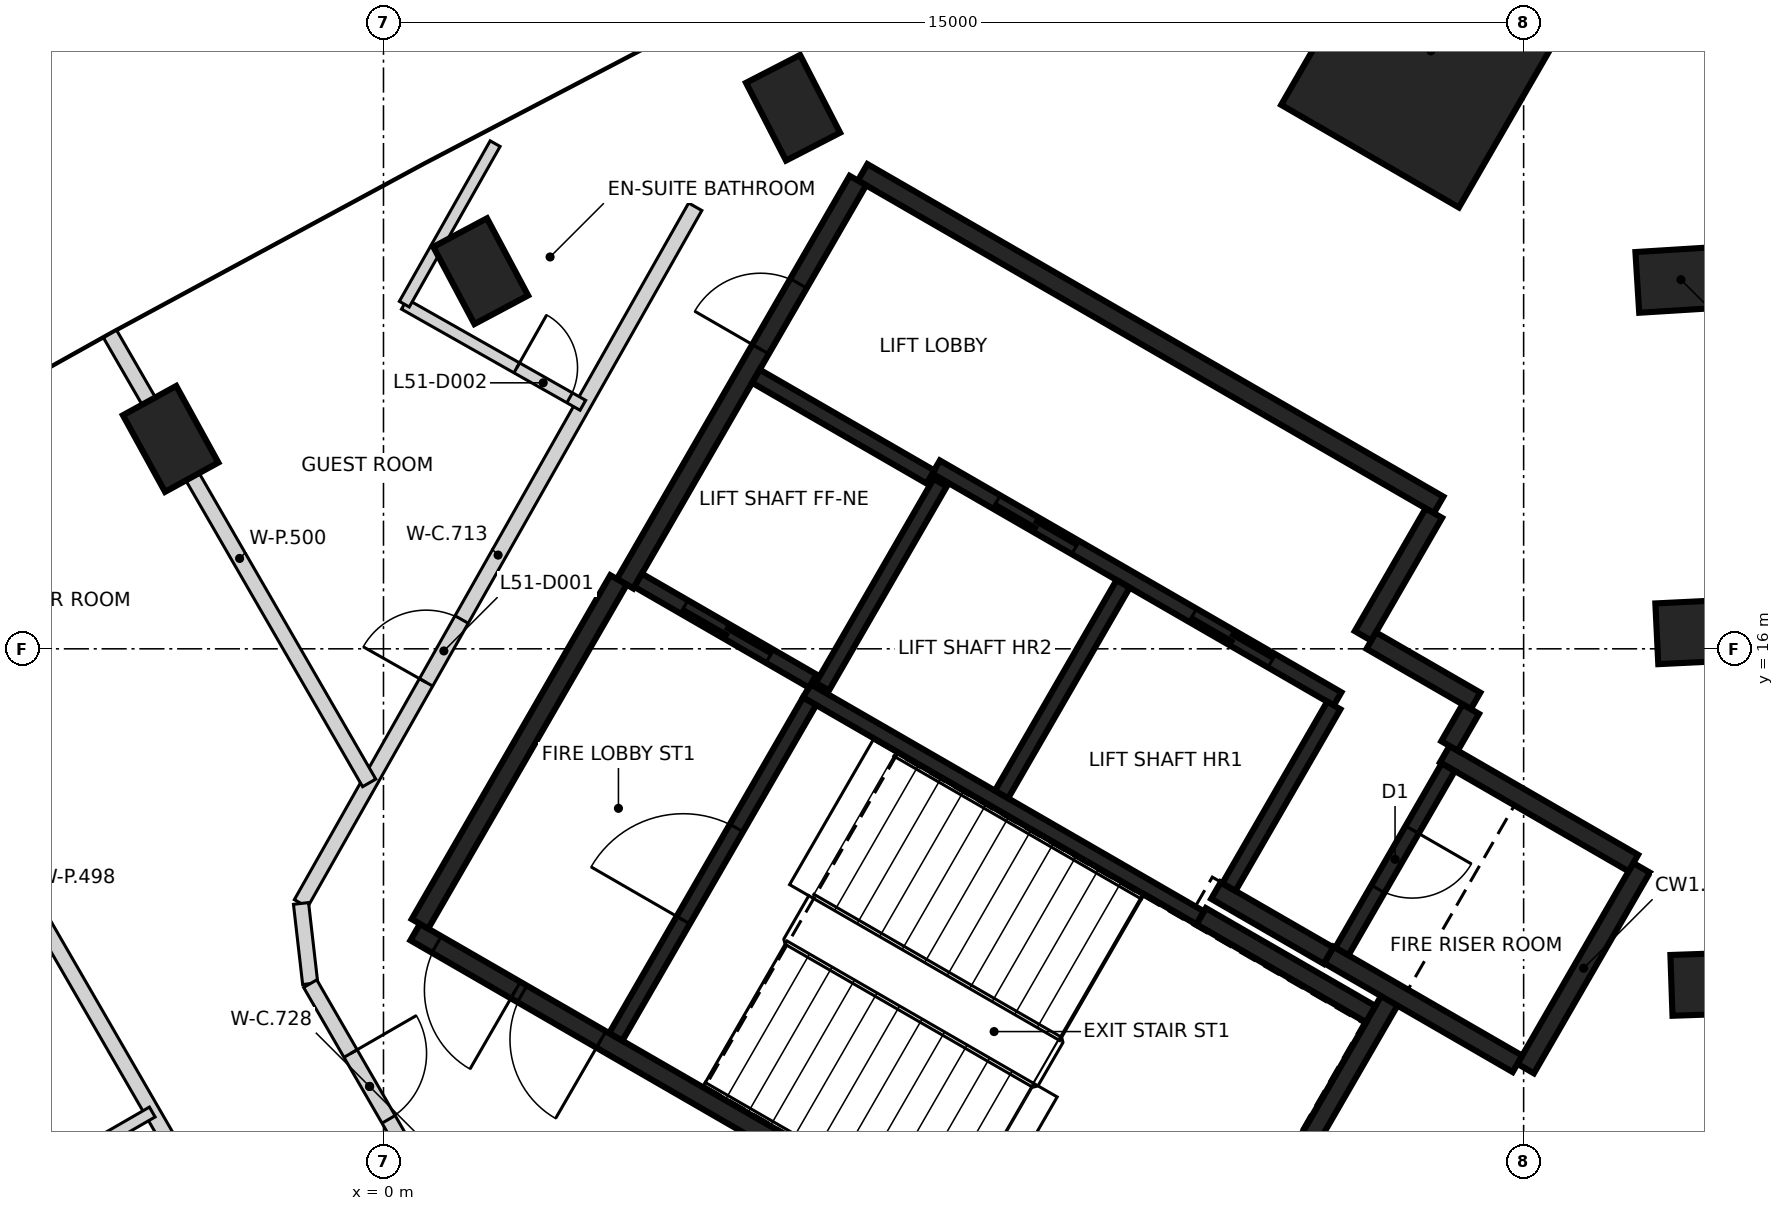
"""IFC4 building model, lengths in metres.
Left out: names, types, materials, properties, quantities, classifications, styles, units other than length and angle.
Written with IfcOpenShell. Run it as: python <this file> out.ifc"""

import sys

from ifc_helpers import new_model, si_unit, direction, frame, frame_2d, origin, origin_2d, place, context, subcontext, project, spatial, rectangle, extrude, element, fill, save


model = new_model("IFC4")
c1 = context("Model", 3, precision=1e-05, world=origin(), true_north=direction((0.0, 1.0)))
c2 = subcontext(c1, "Body", "Model", "MODEL_VIEW")
j1 = project(units=[si_unit("LENGTHUNIT", "METRE"), si_unit("PLANEANGLEUNIT", "RADIAN")], contexts=[c1])
p1 = place(None, origin())
s1 = spatial("IfcSite", under=j1, at=p1, CompositionType="ELEMENT")
p2 = place(p1, origin())
s2 = spatial("IfcBuilding", under=s1, at=p2, CompositionType="ELEMENT")
p3 = place(p2, frame((0.0, 0.0, 204.4)))
s3 = spatial("IfcBuildingStorey", under=s2, at=p3, CompositionType="ELEMENT", Elevation=204.4)
for number, where, z_axis, x_axis in (
    (1, (17.519, 11.592, -0.35), (0.0, 0.0, 1.0), (0.999, 0.034, 0.0)),
    (2, (17.326, 16.226, -0.35), (0.0, 0.0, 1.0), (0.999, 0.048, 0.0)),
    (3, (17.07, 20.856, -0.35), (0.0, 0.0, 1.0), (0.998, 0.062, 0.0)),
    (4, (5.388, 23.118, -0.35), (0.0, 0.0, 1.0), (-0.458, 0.889, 0.0)),
    (5, (1.279, 20.968, -0.35), (0.0, 0.0, 1.0), (-0.47, 0.883, 0.0)),
    (6, (-2.8, 18.762, -0.35), (0.0, 0.0, 1.0), (-0.482, 0.876, 0.0)),
):
    element("IfcColumn", number, at=place(p3, frame(where, z_axis=z_axis, x_axis=x_axis)), inside=s3, PredefinedType="COLUMN", context=c2, shape_type="SweptSolid", body=[
        extrude(rectangle(XDim=1.15, YDim=0.8, at=origin_2d()), origin(), (0.0, 0.0, 1.0), 3.6),
    ])
p4 = place(p3, frame((13.78, 23.867, -0.35), z_axis=(0.0, 0.0, 1.0), x_axis=(0.5, 0.866025403784, 0.0)))
e7 = element("IfcColumn", 7, at=p4, inside=s3, PredefinedType="COLUMN", context=c2, shape_type="SweptSolid", body=[
    extrude(rectangle(XDim=3.2, YDim=2.7, at=origin_2d()), origin(), (0.0, 0.0, 1.0), 3.6),
])
p5 = place(p3, frame((10.42, 6.498, 0.0), z_axis=(0.0, 0.0, 1.0), x_axis=(-0.866021906294, 0.500006057782, 0.0)))
e8 = element("IfcWall", 8, at=p5, inside=s3, PredefinedType="SHEAR", context=c2, shape_type="SweptSolid", body=[
    extrude(rectangle(XDim=11.55, YDim=0.25, at=frame_2d((5.775, 0.0))), origin(), (0.0, 0.0, 1.0), 3.25),
])
p6 = place(p5, frame((10.025, 0.0, 0.0)))
e9 = element("IfcOpeningElement", 9, at=p6, cuts=e8, PredefinedType="OPENING", context=c2, shape_type="SweptSolid", body=[
    extrude(rectangle(XDim=1.2, YDim=2.1, at=frame_2d((0.6, 1.05))), frame((0.0, 0.135, 0.0), z_axis=(0.0, -1.0, 0.0), x_axis=(1.0, 0.0, 0.0)), (0.0, 0.0, 1.0), 0.27),
])
p7 = place(p5, frame((8.725, 0.0, 0.0)))
e10 = element("IfcOpeningElement", 10, at=p7, cuts=e8, PredefinedType="OPENING", context=c2, shape_type="SweptSolid", body=[
    extrude(rectangle(XDim=1.2, YDim=2.1, at=frame_2d((0.6, 1.05))), frame((0.0, 0.135, 0.0), z_axis=(0.0, -1.0, 0.0), x_axis=(1.0, 0.0, 0.0)), (0.0, 0.0, 1.0), 0.27),
])
p8 = place(p3, frame((6.304, 22.269, 0.0), z_axis=(0.0, 0.0, 1.0), x_axis=(0.866022959057, -0.500004234368, 0.0)))
e11 = element("IfcWall", 11, at=p8, inside=s3, PredefinedType="SHEAR", context=c2, shape_type="SweptSolid", body=[
    extrude(rectangle(XDim=8.75, YDim=0.25, at=frame_2d((4.375, 0.0))), origin(), (0.0, 0.0, 1.0), 3.25),
])
p9 = place(p3, frame((3.179, 16.856, 0.0), z_axis=(0.0, 0.0, 1.0), x_axis=(0.500001955336, 0.866024274868, 0.0)))
e12 = element("IfcWall", 12, at=p9, inside=s3, PredefinedType="SHEAR", context=c2, shape_type="SweptSolid", body=[
    extrude(rectangle(XDim=6.125, YDim=0.25, at=frame_2d((3.062, 0.0))), origin(), (0.0, 0.0, 1.0), 3.25),
])
p10 = place(p9, frame((3.563, 0.0, 0.0)))
e13 = element("IfcOpeningElement", 13, at=p10, cuts=e12, PredefinedType="OPENING", context=c2, shape_type="SweptSolid", body=[
    extrude(rectangle(XDim=1.0, YDim=2.1, at=frame_2d((0.5, 1.05))), frame((0.0, 0.135, 0.0), z_axis=(0.0, -1.0, 0.0), x_axis=(1.0, 0.0, 0.0)), (0.0, 0.0, 1.0), 0.27),
])
p11 = place(p3, frame((0.48, 12.381, 0.0), z_axis=(0.0, 0.0, 1.0), x_axis=(0.49999885962, 0.866026062182, 0.0)))
e14 = element("IfcWall", 14, at=p11, inside=s3, PredefinedType="SHEAR", context=c2, shape_type="SweptSolid", body=[
    extrude(rectangle(XDim=5.225, YDim=0.25, at=frame_2d((2.612, 0.0))), origin(), (0.0, 0.0, 1.0), 3.25),
])
p12 = place(p3, frame((13.238, 11.378, 0.0), z_axis=(0.0, 0.0, 1.0), x_axis=(-0.500008851346, -0.866020293397, 0.0)))
e15 = element("IfcWall", 15, at=p12, inside=s3, PredefinedType="SHEAR", context=c2, shape_type="SweptSolid", body=[
    extrude(rectangle(XDim=5.51, YDim=0.25, at=frame_2d((2.755, 0.0))), origin(), (0.0, 0.0, 1.0), 3.25),
])
p13 = place(p3, frame((16.552, 13.119, 0.0), z_axis=(0.0, 0.0, 1.0), x_axis=(-0.499978833458, -0.866037623948, 0.0)))
e16 = element("IfcWall", 16, at=p13, inside=s3, PredefinedType="SHEAR", context=c2, shape_type="SweptSolid", body=[
    extrude(rectangle(XDim=3.05, YDim=0.25, at=frame_2d((1.525, 0.0))), origin(), (0.0, 0.0, 1.0), 3.25),
])
p14 = place(p3, frame((14.918, 10.54, 0.0), z_axis=(0.0, 0.0, 1.0), x_axis=(-0.866063538972, 0.499933942099, 0.0)))
e17 = element("IfcWall", 17, at=p14, inside=s3, PredefinedType="SHEAR", context=c2, shape_type="SweptSolid", body=[
    extrude(rectangle(XDim=2.865, YDim=0.25, at=frame_2d((1.432, 0.0))), origin(), (0.0, 0.0, 1.0), 3.25),
])
p15 = place(p3, frame((13.963, 14.614, 0.0), z_axis=(0.0, 0.0, 1.0), x_axis=(0.866042235819, -0.499970844928, 0.0)))
e18 = element("IfcWall", 18, at=p15, inside=s3, PredefinedType="SHEAR", context=c2, shape_type="SweptSolid", body=[
    extrude(rectangle(XDim=2.865, YDim=0.25, at=frame_2d((1.432, 0.0))), origin(), (0.0, 0.0, 1.0), 3.25),
])
p16 = place(p3, frame((10.757, 12.481, 0.0), z_axis=(0.0, 0.0, 1.0), x_axis=(0.866022940537, -0.500004266446, 0.0)))
e19 = element("IfcWall", 19, at=p16, inside=s3, PredefinedType="SHEAR", context=c2, shape_type="SweptSolid", body=[
    extrude(rectangle(XDim=2.575, YDim=0.25, at=frame_2d((1.287, 0.0))), origin(), (0.0, 0.0, 1.0), 3.25),
])
p17 = place(p3, frame((13.819, 17.785, 0.0), z_axis=(0.0, 0.0, 1.0), x_axis=(-0.500039802285, -0.866002422705, 0.0)))
e20 = element("IfcWall", 20, at=p17, inside=s3, PredefinedType="SHEAR", context=c2, shape_type="SweptSolid", body=[
    extrude(rectangle(XDim=1.865, YDim=0.25, at=frame_2d((0.932, 0.0))), origin(), (0.0, 0.0, 1.0), 3.25),
])
p18 = place(p3, frame((12.433, 11.964, 0.0), z_axis=(0.0, 0.0, 1.0), x_axis=(-0.866038183914, 0.499977863513, 0.0)))
e21 = element("IfcWall", 21, at=p18, inside=s3, PredefinedType="SHEAR", context=c2, shape_type="SweptSolid", body=[
    extrude(rectangle(XDim=1.71, YDim=0.25, at=frame_2d((0.855, 0.0))), origin(), (0.0, 0.0, 1.0), 3.25),
])
p19 = place(p3, frame((12.995, 16.108, 0.0), z_axis=(0.0, 0.0, 1.0), x_axis=(0.866044474677, -0.49996696679, 0.0)))
e22 = element("IfcWall", 22, at=p19, inside=s3, PredefinedType="SHEAR", context=c2, shape_type="SweptSolid", body=[
    extrude(rectangle(XDim=1.584, YDim=0.25, at=frame_2d((0.792, 0.0))), origin(), (0.0, 0.0, 1.0), 3.25),
])
p20 = place(p3, frame((14.305, 15.207, 0.0), z_axis=(0.0, 0.0, 1.0), x_axis=(-0.499848422343, -0.866112899501, 0.0)))
e23 = element("IfcWall", 23, at=p20, inside=s3, PredefinedType="SHEAR", context=c2, shape_type="SweptSolid", body=[
    extrude(rectangle(XDim=0.559, YDim=0.25, at=frame_2d((0.28, 0.0))), origin(), (0.0, 0.0, 1.0), 3.25),
])
p21 = place(p3, frame((12.552, 15.342, 0.0), z_axis=(0.0, 0.0, 1.0), x_axis=(-0.866030299012, 0.499991521122, 0.0)))
e24 = element("IfcWall", 24, at=p21, inside=s3, PredefinedType="SHEAR", context=c2, shape_type="SweptSolid", body=[
    extrude(rectangle(XDim=6.1, YDim=0.2, at=frame_2d((3.05, 0.0))), origin(), (0.0, 0.0, 1.0), 3.25),
])
p22 = place(p21, frame((1.0, 0.0, 0.0)))
e25 = element("IfcOpeningElement", 25, at=p22, cuts=e24, PredefinedType="OPENING", context=c2, shape_type="SweptSolid", body=[
    extrude(rectangle(XDim=1.2, YDim=2.1, at=frame_2d((0.6, 1.05))), frame((0.0, 0.11, 0.0), z_axis=(0.0, -1.0, 0.0), x_axis=(1.0, 0.0, 0.0)), (0.0, 0.0, 1.0), 0.22),
])
p23 = place(p21, frame((3.982, 0.0, 0.0)))
e26 = element("IfcOpeningElement", 26, at=p23, cuts=e24, PredefinedType="OPENING", context=c2, shape_type="SweptSolid", body=[
    extrude(rectangle(XDim=1.2, YDim=2.1, at=frame_2d((0.6, 1.05))), frame((0.0, 0.11, 0.0), z_axis=(0.0, -1.0, 0.0), x_axis=(1.0, 0.0, 0.0)), (0.0, 0.0, 1.0), 0.22),
])
p24 = place(p3, frame((10.743, 12.46, 0.0), z_axis=(0.0, 0.0, 1.0), x_axis=(-0.866018848283, 0.500011354289, 0.0)))
e27 = element("IfcWall", 27, at=p24, inside=s3, PredefinedType="SHEAR", context=c2, shape_type="SweptSolid", body=[
    extrude(rectangle(XDim=5.974, YDim=0.2, at=frame_2d((2.987, 0.0))), origin(), (0.0, 0.0, 1.0), 3.25),
])
p25 = place(p3, frame((3.057, 10.895, 0.0), z_axis=(0.0, 0.0, 1.0), x_axis=(0.500027839223, 0.866009330205, 0.0)))
e28 = element("IfcWall", 28, at=p25, inside=s3, PredefinedType="SHEAR", context=c2, shape_type="SweptSolid", body=[
    extrude(rectangle(XDim=5.098, YDim=0.2, at=frame_2d((2.549, 0.0))), origin(), (0.0, 0.0, 1.0), 3.25),
])
p26 = place(p25, frame((1.774, 0.0, 0.0)))
e29 = element("IfcOpeningElement", 29, at=p26, cuts=e28, PredefinedType="OPENING", context=c2, shape_type="SweptSolid", body=[
    extrude(rectangle(XDim=1.4, YDim=2.1, at=frame_2d((0.7, 1.05))), frame((0.0, 0.11, 0.0), z_axis=(0.0, -1.0, 0.0), x_axis=(1.0, 0.0, 0.0)), (0.0, 0.0, 1.0), 0.22),
])
p27 = place(p3, frame((8.132, 14.084, 0.0), z_axis=(0.0, 0.0, 1.0), x_axis=(0.500030834389, 0.86600760081, 0.0)))
e30 = element("IfcWall", 30, at=p27, inside=s3, PredefinedType="SHEAR", context=c2, shape_type="SweptSolid", body=[
    extrude(rectangle(XDim=3.198, YDim=0.2, at=frame_2d((1.599, 0.0))), origin(), (0.0, 0.0, 1.0), 3.25),
])
p28 = place(p3, frame((14.008, 14.442, 0.0), z_axis=(0.0, 0.0, 1.0), x_axis=(-0.499986818241, -0.866033014143, 0.0)))
e31 = element("IfcWall", 31, at=p28, inside=s3, PredefinedType="SHEAR", context=c2, shape_type="SweptSolid", body=[
    extrude(rectangle(XDim=2.798, YDim=0.2, at=frame_2d((1.399, 0.0))), origin(), (0.0, 0.0, 1.0), 3.25),
])
p29 = place(p28, frame((0.949, 0.0, 0.0)))
e32 = element("IfcOpeningElement", 32, at=p29, cuts=e31, PredefinedType="OPENING", context=c2, shape_type="SweptSolid", body=[
    extrude(rectangle(XDim=0.9, YDim=2.1, at=frame_2d((0.45, 1.05))), frame((0.0, 0.11, 0.0), z_axis=(0.0, -1.0, 0.0), x_axis=(1.0, 0.0, 0.0)), (0.0, 0.0, 1.0), 0.22),
])
p30 = place(p3, frame((12.502, 15.255, 0.0), z_axis=(0.0, 0.0, 1.0), x_axis=(-0.499965018551, -0.866045599391, 0.0)))
e33 = element("IfcWall", 33, at=p30, inside=s3, PredefinedType="SHEAR", context=c2, shape_type="SweptSolid", body=[
    extrude(rectangle(XDim=2.759, YDim=0.2, at=frame_2d((1.379, 0.0))), origin(), (0.0, 0.0, 1.0), 3.25),
])
p31 = place(p3, frame((7.324, 18.187, 0.0), z_axis=(0.0, 0.0, 1.0), x_axis=(-0.499967891604, -0.866043940782, 0.0)))
e34 = element("IfcWall", 34, at=p31, inside=s3, PredefinedType="SHEAR", context=c2, shape_type="SweptSolid", body=[
    extrude(rectangle(XDim=3.1, YDim=0.2, at=frame_2d((1.55, 0.0))), origin(), (0.0, 0.0, 1.0), 3.25),
])
p32 = place(p3, frame((5.646, 15.576, 0.0), z_axis=(0.0, 0.0, 1.0), x_axis=(-0.866018407898, 0.500012117035, 0.0)))
e35 = element("IfcWall", 35, at=p32, inside=s3, PredefinedType="SHEAR", context=c2, shape_type="SweptSolid", body=[
    extrude(rectangle(XDim=2.651, YDim=0.2, at=frame_2d((1.325, 0.0))), origin(), (0.0, 0.0, 1.0), 3.25),
])
p33 = place(p32, frame((0.652, 0.0, 0.0)))
e36 = element("IfcOpeningElement", 36, at=p33, cuts=e35, PredefinedType="OPENING", context=c2, shape_type="SweptSolid", body=[
    extrude(rectangle(XDim=1.3, YDim=2.1, at=frame_2d((0.65, 1.05))), frame((0.0, 0.11, 0.0), z_axis=(0.0, -1.0, 0.0), x_axis=(1.0, 0.0, 0.0)), (0.0, 0.0, 1.0), 0.22),
])
p34 = place(p3, frame((7.196, 18.26, 0.0), z_axis=(0.0, 0.0, 1.0), x_axis=(-0.866018407898, 0.500012117035, 0.0)))
e37 = element("IfcWall", 37, at=p34, inside=s3, PredefinedType="SHEAR", context=c2, shape_type="SweptSolid", body=[
    extrude(rectangle(XDim=2.651, YDim=0.2, at=frame_2d((1.325, 0.0))), origin(), (0.0, 0.0, 1.0), 3.25),
])
p35 = place(p3, frame((-1.086, 12.65, 0.0), z_axis=(0.0, 0.0, 1.0), x_axis=(0.492552173528, 0.87028291742, 0.0)))
e38 = element("IfcWall", 38, at=p35, inside=s3, PredefinedType="PARTITIONING", context=c2, shape_type="SweptSolid", body=[
    extrude(rectangle(XDim=10.531, YDim=0.2, at=frame_2d((5.266, 0.0))), origin(), (0.0, 0.0, 1.0), 3.25),
])
p36 = place(p35, frame((3.342, 0.0, 0.0)))
e39 = element("IfcOpeningElement", 39, at=p36, cuts=e38, PredefinedType="OPENING", context=c2, shape_type="SweptSolid", body=[
    extrude(rectangle(XDim=0.95, YDim=2.1, at=frame_2d((0.475, 1.05))), frame((0.0, 0.11, 0.0), z_axis=(0.0, -1.0, 0.0), x_axis=(1.0, 0.0, 0.0)), (0.0, 0.0, 1.0), 0.22),
])
p37 = place(p3, frame((-1.085, 12.65, 0.0), z_axis=(0.0, 0.0, 1.0), x_axis=(0.113812454263, -0.993502252264, 0.0)))
e40 = element("IfcWall", 40, at=p37, inside=s3, PredefinedType="PARTITIONING", context=c2, shape_type="SweptSolid", body=[
    extrude(rectangle(XDim=1.062, YDim=0.2, at=frame_2d((0.531, 0.0))), origin(), (0.0, 0.0, 1.0), 3.25),
])
p38 = place(p3, frame((-0.964, 11.595, 0.0), z_axis=(0.0, 0.0, 1.0), x_axis=(0.500056215256, -0.865992945458, 0.0)))
e41 = element("IfcWall", 41, at=p38, inside=s3, PredefinedType="PARTITIONING", context=c2, shape_type="SweptSolid", body=[
    extrude(rectangle(XDim=3.124, YDim=0.2, at=frame_2d((1.562, 0.0))), origin(), (0.0, 0.0, 1.0), 3.25),
])
p39 = place(p38, frame((1.062, 0.0, 0.0)))
e42 = element("IfcOpeningElement", 42, at=p39, cuts=e41, PredefinedType="OPENING", context=c2, shape_type="SweptSolid", body=[
    extrude(rectangle(XDim=1.0, YDim=2.1, at=frame_2d((0.5, 1.05))), frame((0.0, 0.11, 0.0), z_axis=(0.0, -1.0, 0.0), x_axis=(1.0, 0.0, 0.0)), (0.0, 0.0, 1.0), 0.22),
])
p40 = place(p3, frame((-7.646, 17.879, 0.0), z_axis=(0.0, 0.0, 1.0), x_axis=(0.500042538917, -0.866000842536, 0.0)))
e43 = element("IfcWall", 43, at=p40, inside=s3, PredefinedType="PARTITIONING", context=c2, shape_type="SweptSolid", body=[
    extrude(rectangle(XDim=11.906, YDim=0.2, at=frame_2d((5.953, 0.0))), origin(), (0.0, 0.0, 1.0), 3.25),
])
p41 = place(p3, frame((-3.598, 20.142, 0.0), z_axis=(0.0, 0.0, 1.0), x_axis=(0.499981732209, -0.866035950442, 0.0)))
e44 = element("IfcWall", 44, at=p41, inside=s3, PredefinedType="PARTITIONING", context=c2, shape_type="SweptSolid", body=[
    extrude(rectangle(XDim=6.82, YDim=0.2, at=frame_2d((3.41, 0.0))), origin(), (0.0, 0.0, 1.0), 3.25),
])
p42 = place(p3, frame((-5.64, 8.406, 0.0), z_axis=(0.0, 0.0, 1.0), x_axis=(0.866010750942, 0.50002537861, 0.0)))
e45 = element("IfcWall", 45, at=p42, inside=s3, PredefinedType="PARTITIONING", context=c2, shape_type="SweptSolid", body=[
    extrude(rectangle(XDim=3.0, YDim=0.15, at=frame_2d((1.5, 0.0))), origin(), (0.0, 0.0, 1.0), 3.25),
])
p43 = place(p3, frame((0.274, 20.534, 0.0), z_axis=(0.0, 0.0, 1.0), x_axis=(0.870234176559, -0.492638283072, 0.0)))
e46 = element("IfcWall", 46, at=p43, inside=s3, PredefinedType="PARTITIONING", context=c2, shape_type="SweptSolid", body=[
    extrude(rectangle(XDim=2.699, YDim=0.15, at=frame_2d((1.35, 0.0))), origin(), (0.0, 0.0, 1.0), 2.35),
])
p44 = place(p43, frame((1.7, 0.0, 0.0)))
e47 = element("IfcOpeningElement", 47, at=p44, cuts=e46, PredefinedType="OPENING", context=c2, shape_type="SweptSolid", body=[
    extrude(rectangle(XDim=0.8, YDim=2.1, at=frame_2d((0.4, 1.05))), frame((0.0, 0.085, 0.0), z_axis=(0.0, -1.0, 0.0), x_axis=(1.0, 0.0, 0.0)), (0.0, 0.0, 1.0), 0.17),
])
p45 = place(p3, frame((0.274, 20.534, 0.0), z_axis=(0.0, 0.0, 1.0), x_axis=(0.492461641571, 0.870334149383, 0.0)))
e48 = element("IfcWall", 48, at=p45, inside=s3, PredefinedType="PARTITIONING", context=c2, shape_type="SweptSolid", body=[
    extrude(rectangle(XDim=2.427, YDim=0.15, at=frame_2d((1.213, 0.0))), origin(), (0.0, 0.0, 1.0), 2.35),
])
p46 = place(p33, origin())
e49 = element("IfcDoor", 49, at=p46, inside=s3, OperationType="SLIDING_TO_LEFT", PredefinedType="DOOR", context=c2, shape_type="SweptSolid", body=[
    extrude(rectangle(XDim=1.3, YDim=2.1, at=frame_2d((0.65, 1.05))), frame((0.0, 0.025, 0.0), z_axis=(0.0, -1.0, 0.0), x_axis=(1.0, 0.0, 0.0)), (0.0, 0.0, 1.0), 0.05),
])
fill(e36, e49)
p47 = place(p22, origin())
e50 = element("IfcDoor", 50, at=p47, inside=s3, OperationType="DOUBLE_DOOR_SLIDING", PredefinedType="DOOR", context=c2, shape_type="SweptSolid", body=[
    extrude(rectangle(XDim=1.2, YDim=2.1, at=frame_2d((0.6, 1.05))), frame((0.0, 0.025, 0.0), z_axis=(0.0, -1.0, 0.0), x_axis=(1.0, 0.0, 0.0)), (0.0, 0.0, 1.0), 0.05),
])
fill(e25, e50)
p48 = place(p23, origin())
e51 = element("IfcDoor", 51, at=p48, inside=s3, OperationType="DOUBLE_DOOR_SLIDING", PredefinedType="DOOR", context=c2, shape_type="SweptSolid", body=[
    extrude(rectangle(XDim=1.2, YDim=2.1, at=frame_2d((0.6, 1.05))), frame((0.0, 0.025, 0.0), z_axis=(0.0, -1.0, 0.0), x_axis=(1.0, 0.0, 0.0)), (0.0, 0.0, 1.0), 0.05),
])
fill(e26, e51)
p49 = place(p10, origin())
e52 = element("IfcDoor", 52, at=p49, inside=s3, OperationType="SINGLE_SWING_LEFT", PredefinedType="DOOR", context=c2, shape_type="SweptSolid", body=[
    extrude(rectangle(XDim=1.0, YDim=2.1, at=frame_2d((0.5, 1.05))), frame((0.0, 0.025, 0.0), z_axis=(0.0, -1.0, 0.0), x_axis=(1.0, 0.0, 0.0)), (0.0, 0.0, 1.0), 0.05),
])
fill(e13, e52)
p50 = place(p6, origin())
e53 = element("IfcDoor", 53, at=p50, inside=s3, OperationType="SINGLE_SWING_LEFT", PredefinedType="DOOR", context=c2, shape_type="SweptSolid", body=[
    extrude(rectangle(XDim=1.2, YDim=2.1, at=frame_2d((0.6, 1.05))), frame((0.0, 0.025, 0.0), z_axis=(0.0, -1.0, 0.0), x_axis=(1.0, 0.0, 0.0)), (0.0, 0.0, 1.0), 0.05),
])
fill(e9, e53)
p51 = place(p7, origin())
e54 = element("IfcDoor", 54, at=p51, inside=s3, OperationType="SINGLE_SWING_RIGHT", PredefinedType="DOOR", context=c2, shape_type="SweptSolid", body=[
    extrude(rectangle(XDim=1.2, YDim=2.1, at=frame_2d((0.6, 1.05))), frame((0.0, 0.025, 0.0), z_axis=(0.0, -1.0, 0.0), x_axis=(1.0, 0.0, 0.0)), (0.0, 0.0, 1.0), 0.05),
])
fill(e10, e54)
p52 = place(p26, origin())
e55 = element("IfcDoor", 55, at=p52, inside=s3, OperationType="SINGLE_SWING_LEFT", PredefinedType="DOOR", context=c2, shape_type="SweptSolid", body=[
    extrude(rectangle(XDim=1.4, YDim=2.1, at=frame_2d((0.7, 1.05))), frame((0.0, 0.025, 0.0), z_axis=(0.0, -1.0, 0.0), x_axis=(1.0, 0.0, 0.0)), (0.0, 0.0, 1.0), 0.05),
])
fill(e29, e55)
p53 = place(p29, origin())
e56 = element("IfcDoor", 56, at=p53, inside=s3, OperationType="SINGLE_SWING_RIGHT", PredefinedType="DOOR", context=c2, shape_type="SweptSolid", body=[
    extrude(rectangle(XDim=0.9, YDim=2.1, at=frame_2d((0.45, 1.05))), frame((0.0, 0.025, 0.0), z_axis=(0.0, -1.0, 0.0), x_axis=(1.0, 0.0, 0.0)), (0.0, 0.0, 1.0), 0.05),
])
fill(e32, e56)
p54 = place(p36, origin())
e57 = element("IfcDoor", 57, at=p54, inside=s3, OperationType="SINGLE_SWING_LEFT", PredefinedType="DOOR", context=c2, shape_type="SweptSolid", body=[
    extrude(rectangle(XDim=0.95, YDim=2.1, at=frame_2d((0.475, 1.05))), frame((0.0, 0.025, 0.0), z_axis=(0.0, -1.0, 0.0), x_axis=(1.0, 0.0, 0.0)), (0.0, 0.0, 1.0), 0.05),
])
fill(e39, e57)
p55 = place(p44, frame((0.8, 0.0, 0.0), z_axis=(0.0, 0.0, 1.0), x_axis=(-1.0, 0.0, 0.0)))
e58 = element("IfcDoor", 58, at=p55, inside=s3, OperationType="SINGLE_SWING_LEFT", PredefinedType="DOOR", context=c2, shape_type="SweptSolid", body=[
    extrude(rectangle(XDim=0.8, YDim=2.1, at=frame_2d((0.4, 1.05))), frame((0.0, 0.025, 0.0), z_axis=(0.0, -1.0, 0.0), x_axis=(1.0, 0.0, 0.0)), (0.0, 0.0, 1.0), 0.05),
])
fill(e47, e58)
p56 = place(p39, frame((1.0, 0.0, 0.0), z_axis=(0.0, 0.0, 1.0), x_axis=(-1.0, 0.0, 0.0)))
e59 = element("IfcDoor", 59, at=p56, inside=s3, OperationType="SINGLE_SWING_LEFT", PredefinedType="DOOR", context=c2, shape_type="SweptSolid", body=[
    extrude(rectangle(XDim=1.0, YDim=2.1, at=frame_2d((0.5, 1.05))), frame((0.0, 0.025, 0.0), z_axis=(0.0, -1.0, 0.0), x_axis=(1.0, 0.0, 0.0)), (0.0, 0.0, 1.0), 0.05),
])
fill(e42, e59)
save(model, sys.argv[1])
